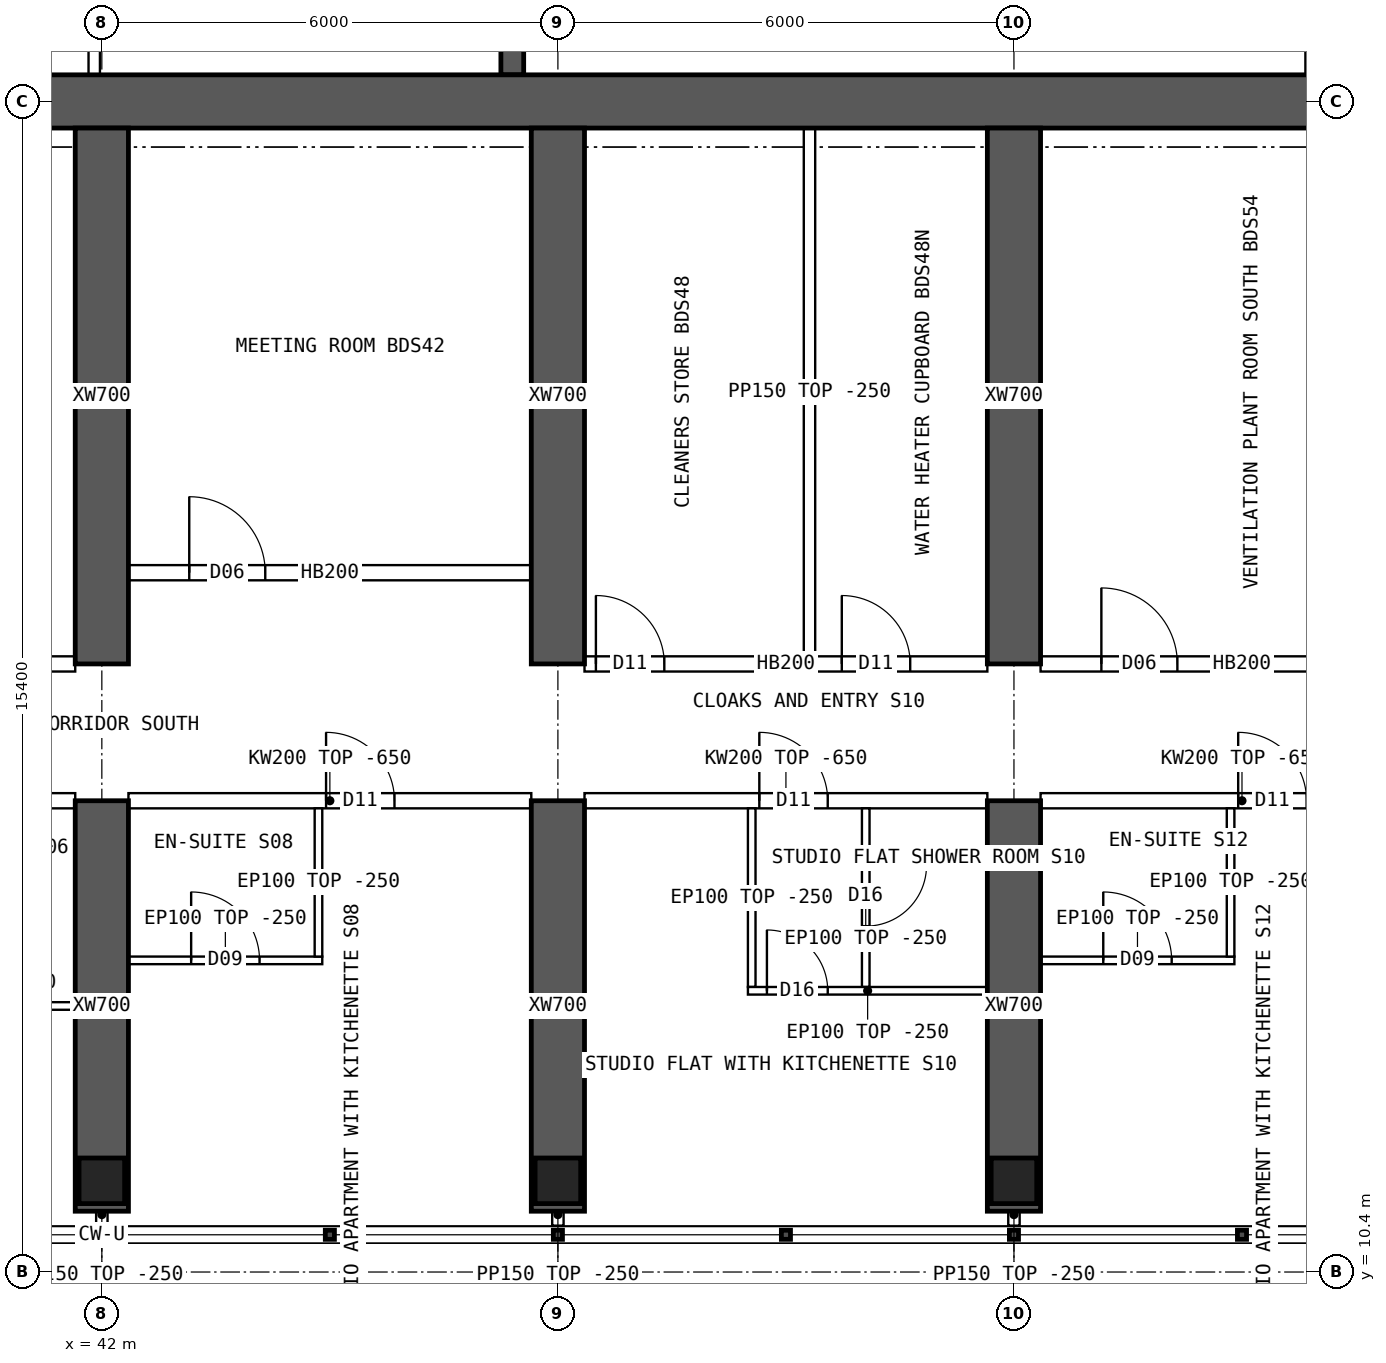
"""IFC4 building model, lengths in metres.
Left out: names, types, materials, properties, quantities, classifications, styles, units other than length and angle.
Written with IfcOpenShell. Run it as: python <this file> out.ifc"""

import sys

from ifc_helpers import new_model, si_unit, direction, frame, frame_2d, origin, origin_2d, place, context, subcontext, project, spatial, polyline, rectangle, hollow_rectangle, outline, extrude, element, fill, save


model = new_model("IFC4")
c1 = context("Model", 3, precision=1e-05, world=origin(), true_north=direction((0.0, 1.0)))
c2 = subcontext(c1, "Body", "Model", "MODEL_VIEW")
j1 = project(units=[si_unit("LENGTHUNIT", "METRE"), si_unit("PLANEANGLEUNIT", "RADIAN")], contexts=[c1])
p1 = place(None, origin())
s1 = spatial("IfcSite", under=j1, at=p1, CompositionType="ELEMENT")
p2 = place(p1, origin())
s2 = spatial("IfcBuilding", under=s1, at=p2, CompositionType="ELEMENT")
p3 = place(p2, frame((0.0, 0.0, 224.05)))
s3 = spatial("IfcBuildingStorey", under=s2, at=p3, CompositionType="ELEMENT", Elevation=224.05)
for number, where, z_axis, x_axis in (
    (1, (42.0, 11.6, 0.0), (0.0, 0.0, 1.0), (1.0, 0.0, 0.0)),
    (2, (48.0, 11.6, 0.0), (0.0, 0.0, 1.0), (1.0, 0.0, 0.0)),
    (3, (54.0, 11.6, 0.0), (0.0, 0.0, 1.0), (1.0, 0.0, 0.0)),
):
    element("IfcColumn", number, at=place(p3, frame(where, z_axis=z_axis, x_axis=x_axis)), inside=s3, PredefinedType="COLUMN", context=c2, shape_type="SweptSolid", body=[
        extrude(hollow_rectangle(XDim=0.6, YDim=0.6, WallThickness=0.06, at=origin_2d()), origin(), (0.0, 0.0, 1.0), 3.75),
    ])
p4 = place(p3, frame((18.0, 25.8, 0.0), z_axis=(0.0, 0.0, 1.0), x_axis=(1.0, 0.0, 0.0)))
e4 = element("IfcWall", 4, at=p4, inside=s3, PredefinedType="SHEAR", context=c2, shape_type="SweptSolid", body=[
    extrude(rectangle(XDim=48.0, YDim=0.7, at=frame_2d((24.0, 0.0))), origin(), (0.0, 0.0, 1.0), 3.75),
])
for number, where, z_axis, x_axis in (
    (5, (58.0, 26.15, 0.0), (0.0, 0.0, 1.0), (0.0, 1.0, 0.0)),
    (6, (47.4, 26.15, 0.0), (0.0, 0.0, 1.0), (0.0, 1.0, 0.0)),
):
    element("IfcWall", number, at=place(p3, frame(where, z_axis=z_axis, x_axis=x_axis)), inside=s3, PredefinedType="SHEAR", context=c2, shape_type="SweptSolid", body=[
        extrude(rectangle(XDim=4.1, YDim=0.3, at=frame_2d((2.05, 0.0))), origin(), (0.0, 0.0, 1.0), 3.75),
    ])
p5 = place(p3, frame((42.0, 11.2, 0.0), z_axis=(0.0, 0.0, 1.0), x_axis=(0.0, 1.0, 0.0)))
e7 = element("IfcWall", 7, at=p5, inside=s3, PredefinedType="SHEAR", context=c2, shape_type="SweptSolid", body=[
    extrude(rectangle(XDim=5.4, YDim=0.7, at=frame_2d((2.7, 0.0))), origin(), (0.0, 0.0, 1.0), 3.75),
])
p6 = place(p3, frame((42.0, 18.4, 0.0), z_axis=(0.0, 0.0, 1.0), x_axis=(0.0, 1.0, 0.0)))
e8 = element("IfcWall", 8, at=p6, inside=s3, PredefinedType="SHEAR", context=c2, shape_type="SweptSolid", body=[
    extrude(rectangle(XDim=7.05, YDim=0.7, at=frame_2d((3.525, 0.0))), origin(), (0.0, 0.0, 1.0), 3.75),
])
p7 = place(p3, frame((48.0, 11.2, 0.0), z_axis=(0.0, 0.0, 1.0), x_axis=(0.0, 1.0, 0.0)))
e9 = element("IfcWall", 9, at=p7, inside=s3, PredefinedType="SHEAR", context=c2, shape_type="SweptSolid", body=[
    extrude(rectangle(XDim=5.4, YDim=0.7, at=frame_2d((2.7, 0.0))), origin(), (0.0, 0.0, 1.0), 3.75),
])
p8 = place(p3, frame((48.0, 18.4, 0.0), z_axis=(0.0, 0.0, 1.0), x_axis=(0.0, 1.0, 0.0)))
e10 = element("IfcWall", 10, at=p8, inside=s3, PredefinedType="SHEAR", context=c2, shape_type="SweptSolid", body=[
    extrude(rectangle(XDim=7.05, YDim=0.7, at=frame_2d((3.525, 0.0))), origin(), (0.0, 0.0, 1.0), 3.75),
])
p9 = place(p3, frame((54.0, 11.2, 0.0), z_axis=(0.0, 0.0, 1.0), x_axis=(0.0, 1.0, 0.0)))
e11 = element("IfcWall", 11, at=p9, inside=s3, PredefinedType="SHEAR", context=c2, shape_type="SweptSolid", body=[
    extrude(rectangle(XDim=5.4, YDim=0.7, at=frame_2d((2.7, 0.0))), origin(), (0.0, 0.0, 1.0), 3.75),
])
p10 = place(p3, frame((54.0, 18.4, 0.0), z_axis=(0.0, 0.0, 1.0), x_axis=(0.0, 1.0, 0.0)))
e12 = element("IfcWall", 12, at=p10, inside=s3, PredefinedType="SHEAR", context=c2, shape_type="SweptSolid", body=[
    extrude(rectangle(XDim=7.05, YDim=0.7, at=frame_2d((3.525, 0.0))), origin(), (0.0, 0.0, 1.0), 3.75),
])
p11 = place(p3, frame((41.9, 26.15, 0.0), z_axis=(0.0, 0.0, 1.0), x_axis=(0.0, 1.0, 0.0)))
e13 = element("IfcWall", 13, at=p11, inside=s3, PredefinedType="SOLIDWALL", context=c2, shape_type="SweptSolid", body=[
    extrude(rectangle(XDim=4.1, YDim=0.15, at=frame_2d((2.05, 0.0))), origin(), (0.0, 0.0, 1.0), 3.5),
])
p12 = place(p3, frame((36.35, 16.6, 0.0), z_axis=(0.0, 0.0, 1.0), x_axis=(1.0, 0.0, 0.0)))
e14 = element("IfcWall", 14, at=p12, inside=s3, PredefinedType="SOLIDWALL", context=c2, shape_type="SweptSolid", body=[
    extrude(outline(polyline([(0.0, 0.0), (5.3, 0.0), (5.3, 3.1), (0.0, 3.1), (0.0, 0.0)])), frame((0.0, 0.1, 0.0), z_axis=(0.0, -1.0, 0.0), x_axis=(1.0, 0.0, 0.0)), (0.0, 0.0, 1.0), 0.2),
])
p13 = place(p12, frame((0.3, 0.0, 0.0)))
e15 = element("IfcOpeningElement", 15, at=p13, cuts=e14, PredefinedType="OPENING", context=c2, shape_type="SweptSolid", body=[
    extrude(rectangle(XDim=1.0, YDim=2.1, at=frame_2d((0.5, 1.05))), frame((0.0, 0.11, 0.0), z_axis=(0.0, -1.0, 0.0), x_axis=(1.0, 0.0, 0.0)), (0.0, 0.0, 1.0), 0.22),
])
p14 = place(p3, frame((36.35, 18.4, 0.0), z_axis=(0.0, 0.0, 1.0), x_axis=(1.0, 0.0, 0.0)))
e16 = element("IfcWall", 16, at=p14, inside=s3, PredefinedType="SOLIDWALL", context=c2, shape_type="SweptSolid", body=[
    extrude(rectangle(XDim=5.3, YDim=0.2, at=frame_2d((2.65, 0.0))), origin(), (0.0, 0.0, 1.0), 3.5),
])
p15 = place(p14, frame((0.525, 0.0, 0.0)))
e17 = element("IfcOpeningElement", 17, at=p15, cuts=e16, PredefinedType="OPENING", context=c2, shape_type="SweptSolid", body=[
    extrude(rectangle(XDim=1.0, YDim=2.1, at=frame_2d((0.5, 1.05))), frame((0.0, 0.11, 0.0), z_axis=(0.0, -1.0, 0.0), x_axis=(1.0, 0.0, 0.0)), (0.0, 0.0, 1.0), 0.22),
])
p16 = place(p3, frame((42.35, 16.6, 0.0), z_axis=(0.0, 0.0, 1.0), x_axis=(1.0, 0.0, 0.0)))
e18 = element("IfcWall", 18, at=p16, inside=s3, PredefinedType="SOLIDWALL", context=c2, shape_type="SweptSolid", body=[
    extrude(outline(polyline([(0.0, 0.0), (5.3, 0.0), (5.3, 3.1), (0.0, 3.1), (0.0, 0.0)])), frame((0.0, 0.1, 0.0), z_axis=(0.0, -1.0, 0.0), x_axis=(1.0, 0.0, 0.0)), (0.0, 0.0, 1.0), 0.2),
])
p17 = place(p16, frame((2.6, 0.0, 0.0)))
e19 = element("IfcOpeningElement", 19, at=p17, cuts=e18, PredefinedType="OPENING", context=c2, shape_type="SweptSolid", body=[
    extrude(rectangle(XDim=0.9, YDim=2.1, at=frame_2d((0.45, 1.05))), frame((0.0, 0.11, 0.0), z_axis=(0.0, -1.0, 0.0), x_axis=(1.0, 0.0, 0.0)), (0.0, 0.0, 1.0), 0.22),
])
p18 = place(p3, frame((48.35, 16.6, 0.0), z_axis=(0.0, 0.0, 1.0), x_axis=(1.0, 0.0, 0.0)))
e20 = element("IfcWall", 20, at=p18, inside=s3, PredefinedType="SOLIDWALL", context=c2, shape_type="SweptSolid", body=[
    extrude(outline(polyline([(0.0, 0.0), (5.3, 0.0), (5.3, 3.1), (0.0, 3.1), (0.0, 0.0)])), frame((0.0, 0.1, 0.0), z_axis=(0.0, -1.0, 0.0), x_axis=(1.0, 0.0, 0.0)), (0.0, 0.0, 1.0), 0.2),
])
p19 = place(p18, frame((2.3, 0.0, 0.0)))
e21 = element("IfcOpeningElement", 21, at=p19, cuts=e20, PredefinedType="OPENING", context=c2, shape_type="SweptSolid", body=[
    extrude(rectangle(XDim=0.9, YDim=2.1, at=frame_2d((0.45, 1.05))), frame((0.0, 0.11, 0.0), z_axis=(0.0, -1.0, 0.0), x_axis=(1.0, 0.0, 0.0)), (0.0, 0.0, 1.0), 0.22),
])
p20 = place(p3, frame((48.35, 18.4, 0.0), z_axis=(0.0, 0.0, 1.0), x_axis=(1.0, 0.0, 0.0)))
e22 = element("IfcWall", 22, at=p20, inside=s3, PredefinedType="SOLIDWALL", context=c2, shape_type="SweptSolid", body=[
    extrude(rectangle(XDim=5.3, YDim=0.2, at=frame_2d((2.65, 0.0))), origin(), (0.0, 0.0, 1.0), 3.5),
])
p21 = place(p20, frame((0.15, 0.0, 0.0)))
e23 = element("IfcOpeningElement", 23, at=p21, cuts=e22, PredefinedType="OPENING", context=c2, shape_type="SweptSolid", body=[
    extrude(rectangle(XDim=0.9, YDim=2.1, at=frame_2d((0.45, 1.05))), frame((0.0, 0.11, 0.0), z_axis=(0.0, -1.0, 0.0), x_axis=(1.0, 0.0, 0.0)), (0.0, 0.0, 1.0), 0.22),
])
p22 = place(p20, frame((3.385, 0.0, 0.0)))
e24 = element("IfcOpeningElement", 24, at=p22, cuts=e22, PredefinedType="OPENING", context=c2, shape_type="SweptSolid", body=[
    extrude(rectangle(XDim=0.9, YDim=2.1, at=frame_2d((0.45, 1.05))), frame((0.0, 0.11, 0.0), z_axis=(0.0, -1.0, 0.0), x_axis=(1.0, 0.0, 0.0)), (0.0, 0.0, 1.0), 0.22),
])
p23 = place(p3, frame((54.35, 16.6, 0.0), z_axis=(0.0, 0.0, 1.0), x_axis=(1.0, 0.0, 0.0)))
e25 = element("IfcWall", 25, at=p23, inside=s3, PredefinedType="SOLIDWALL", context=c2, shape_type="SweptSolid", body=[
    extrude(outline(polyline([(0.0, 0.0), (5.3, 0.0), (5.3, 3.1), (0.0, 3.1), (0.0, 0.0)])), frame((0.0, 0.1, 0.0), z_axis=(0.0, -1.0, 0.0), x_axis=(1.0, 0.0, 0.0)), (0.0, 0.0, 1.0), 0.2),
])
p24 = place(p23, frame((2.6, 0.0, 0.0)))
e26 = element("IfcOpeningElement", 26, at=p24, cuts=e25, PredefinedType="OPENING", context=c2, shape_type="SweptSolid", body=[
    extrude(rectangle(XDim=0.9, YDim=2.1, at=frame_2d((0.45, 1.05))), frame((0.0, 0.11, 0.0), z_axis=(0.0, -1.0, 0.0), x_axis=(1.0, 0.0, 0.0)), (0.0, 0.0, 1.0), 0.22),
])
p25 = place(p3, frame((54.35, 18.4, 0.0), z_axis=(0.0, 0.0, 1.0), x_axis=(1.0, 0.0, 0.0)))
e27 = element("IfcWall", 27, at=p25, inside=s3, PredefinedType="SOLIDWALL", context=c2, shape_type="SweptSolid", body=[
    extrude(rectangle(XDim=5.3, YDim=0.2, at=frame_2d((2.65, 0.0))), origin(), (0.0, 0.0, 1.0), 3.5),
])
p26 = place(p25, frame((0.8, 0.0, 0.0)))
e28 = element("IfcOpeningElement", 28, at=p26, cuts=e27, PredefinedType="OPENING", context=c2, shape_type="SweptSolid", body=[
    extrude(rectangle(XDim=1.0, YDim=2.1, at=frame_2d((0.5, 1.05))), frame((0.0, 0.11, 0.0), z_axis=(0.0, -1.0, 0.0), x_axis=(1.0, 0.0, 0.0)), (0.0, 0.0, 1.0), 0.22),
])
p27 = place(p3, frame((39.0, 13.9, 0.0), z_axis=(0.0, 0.0, 1.0), x_axis=(1.0, 0.0, 0.0)))
e29 = element("IfcWall", 29, at=p27, inside=s3, PredefinedType="PARTITIONING", context=c2, shape_type="SweptSolid", body=[
    extrude(rectangle(XDim=2.65, YDim=0.1, at=frame_2d((1.325, 0.0))), origin(), (0.0, 0.0, 1.0), 3.5),
])
p28 = place(p3, frame((44.9, 14.5, 0.0), z_axis=(0.0, 0.0, 1.0), x_axis=(-1.0, 0.0, 0.0)))
e30 = element("IfcWall", 30, at=p28, inside=s3, PredefinedType="PARTITIONING", context=c2, shape_type="SweptSolid", body=[
    extrude(rectangle(XDim=2.55, YDim=0.1, at=frame_2d((1.275, 0.0))), origin(), (0.0, 0.0, 1.0), 3.5),
])
p29 = place(p28, frame((0.825, 0.0, 0.0)))
e31 = element("IfcOpeningElement", 31, at=p29, cuts=e30, PredefinedType="OPENING", context=c2, shape_type="SweptSolid", body=[
    extrude(rectangle(XDim=0.9, YDim=2.1, at=frame_2d((0.45, 1.05))), frame((0.0, 0.06, 0.0), z_axis=(0.0, -1.0, 0.0), x_axis=(1.0, 0.0, 0.0)), (0.0, 0.0, 1.0), 0.12),
])
p30 = place(p3, frame((44.85, 14.55, 0.0), z_axis=(0.0, 0.0, 1.0), x_axis=(0.0, 1.0, 0.0)))
e32 = element("IfcWall", 32, at=p30, inside=s3, PredefinedType="PARTITIONING", context=c2, shape_type="SweptSolid", body=[
    extrude(outline(polyline([(0.0, 0.0), (1.95, 0.0), (1.95, 3.1), (1.902, 3.1), (1.9, 3.5), (0.0, 3.5), (0.0, 0.0)])), frame((0.0, 0.05, 0.0), z_axis=(0.0, -1.0, 0.0), x_axis=(1.0, 0.0, 0.0)), (0.0, 0.0, 1.0), 0.1),
])
p31 = place(p3, frame((53.65, 14.1, 0.0), z_axis=(0.0, 0.0, 1.0), x_axis=(-1.0, 0.0, 0.0)))
e33 = element("IfcWall", 33, at=p31, inside=s3, PredefinedType="PARTITIONING", context=c2, shape_type="SweptSolid", body=[
    extrude(rectangle(XDim=3.15, YDim=0.1, at=frame_2d((1.575, 0.0))), origin(), (0.0, 0.0, 1.0), 3.5),
])
p32 = place(p31, frame((2.1, 0.0, 0.0)))
e34 = element("IfcOpeningElement", 34, at=p32, cuts=e33, PredefinedType="OPENING", context=c2, shape_type="SweptSolid", body=[
    extrude(rectangle(XDim=0.8, YDim=2.1, at=frame_2d((0.4, 1.05))), frame((0.0, 0.06, 0.0), z_axis=(0.0, -1.0, 0.0), x_axis=(1.0, 0.0, 0.0)), (0.0, 0.0, 1.0), 0.12),
])
p33 = place(p3, frame((50.55, 14.15, 0.0), z_axis=(0.0, 0.0, 1.0), x_axis=(0.0, 1.0, 0.0)))
e35 = element("IfcWall", 35, at=p33, inside=s3, PredefinedType="PARTITIONING", context=c2, shape_type="SweptSolid", body=[
    extrude(outline(polyline([(0.0, 0.0), (2.35, 0.0), (2.35, 3.1), (2.302, 3.1), (2.3, 3.5), (0.0, 3.5), (0.0, 0.0)])), frame((0.0, 0.05, 0.0), z_axis=(0.0, -1.0, 0.0), x_axis=(1.0, 0.0, 0.0)), (0.0, 0.0, 1.0), 0.1),
])
p34 = place(p3, frame((52.05, 14.15, 0.0), z_axis=(0.0, 0.0, 1.0), x_axis=(0.0, 1.0, 0.0)))
e36 = element("IfcWall", 36, at=p34, inside=s3, PredefinedType="PARTITIONING", context=c2, shape_type="SweptSolid", body=[
    extrude(outline(polyline([(0.0, 0.0), (2.35, 0.0), (2.35, 3.1), (2.302, 3.1), (2.3, 3.5), (0.0, 3.5), (0.0, 0.0)])), frame((0.0, 0.05, 0.0), z_axis=(0.0, -1.0, 0.0), x_axis=(1.0, 0.0, 0.0)), (0.0, 0.0, 1.0), 0.1),
])
p35 = place(p34, frame((0.8, 0.0, 0.0)))
e37 = element("IfcOpeningElement", 37, at=p35, cuts=e36, PredefinedType="OPENING", context=c2, shape_type="SweptSolid", body=[
    extrude(rectangle(XDim=0.8, YDim=2.1, at=frame_2d((0.4, 1.05))), frame((0.0, 0.06, 0.0), z_axis=(0.0, -1.0, 0.0), x_axis=(1.0, 0.0, 0.0)), (0.0, 0.0, 1.0), 0.12),
])
p36 = place(p3, frame((56.9, 14.5, 0.0), z_axis=(0.0, 0.0, 1.0), x_axis=(-1.0, 0.0, 0.0)))
e38 = element("IfcWall", 38, at=p36, inside=s3, PredefinedType="PARTITIONING", context=c2, shape_type="SweptSolid", body=[
    extrude(rectangle(XDim=2.55, YDim=0.1, at=frame_2d((1.275, 0.0))), origin(), (0.0, 0.0, 1.0), 3.5),
])
p37 = place(p36, frame((0.825, 0.0, 0.0)))
e39 = element("IfcOpeningElement", 39, at=p37, cuts=e38, PredefinedType="OPENING", context=c2, shape_type="SweptSolid", body=[
    extrude(rectangle(XDim=0.9, YDim=2.1, at=frame_2d((0.45, 1.05))), frame((0.0, 0.06, 0.0), z_axis=(0.0, -1.0, 0.0), x_axis=(1.0, 0.0, 0.0)), (0.0, 0.0, 1.0), 0.12),
])
p38 = place(p3, frame((56.85, 14.55, 0.0), z_axis=(0.0, 0.0, 1.0), x_axis=(0.0, 1.0, 0.0)))
e40 = element("IfcWall", 40, at=p38, inside=s3, PredefinedType="PARTITIONING", context=c2, shape_type="SweptSolid", body=[
    extrude(outline(polyline([(0.0, 0.0), (1.95, 0.0), (1.95, 3.1), (1.902, 3.1), (1.9, 3.5), (0.0, 3.5), (0.0, 0.0)])), frame((0.0, 0.05, 0.0), z_axis=(0.0, -1.0, 0.0), x_axis=(1.0, 0.0, 0.0)), (0.0, 0.0, 1.0), 0.1),
])
p39 = place(p3, frame((42.35, 19.6, 0.0), z_axis=(0.0, 0.0, 1.0), x_axis=(1.0, 0.0, 0.0)))
e41 = element("IfcWall", 41, at=p39, inside=s3, PredefinedType="SOLIDWALL", context=c2, shape_type="SweptSolid", body=[
    extrude(rectangle(XDim=5.3, YDim=0.2, at=frame_2d((2.65, 0.0))), origin(), (0.0, 0.0, 1.0), 3.5),
])
p40 = place(p39, frame((0.8, 0.0, 0.0)))
e42 = element("IfcOpeningElement", 42, at=p40, cuts=e41, PredefinedType="OPENING", context=c2, shape_type="SweptSolid", body=[
    extrude(rectangle(XDim=1.0, YDim=2.1, at=frame_2d((0.5, 1.05))), frame((0.0, 0.11, 0.0), z_axis=(0.0, -1.0, 0.0), x_axis=(1.0, 0.0, 0.0)), (0.0, 0.0, 1.0), 0.22),
])
p41 = place(p3, frame((51.31, 18.5, 0.0), z_axis=(0.0, 0.0, 1.0), x_axis=(0.0, 1.0, 0.0)))
e43 = element("IfcWall", 43, at=p41, inside=s3, PredefinedType="PARTITIONING", context=c2, shape_type="SweptSolid", body=[
    extrude(rectangle(XDim=6.95, YDim=0.15, at=frame_2d((3.475, 0.0))), origin(), (0.0, 0.0, 1.0), 3.5),
])
for number, where, z_axis, x_axis in (
    (44, (42.0, 11.3, 0.0), (0.0, 0.0, 1.0), (0.0, -1.0, 0.0)),
    (45, (48.0, 11.3, 0.0), (0.0, 0.0, 1.0), (0.0, -1.0, 0.0)),
    (46, (54.0, 11.3, 0.0), (0.0, 0.0, 1.0), (0.0, -1.0, 0.0)),
):
    element("IfcWall", number, at=place(p3, frame(where, z_axis=z_axis, x_axis=x_axis)), inside=s3, PredefinedType="PARTITIONING", context=c2, shape_type="SweptSolid", body=[
        extrude(rectangle(XDim=0.29, YDim=0.15, at=frame_2d((0.145, 0.0))), origin(), (0.0, 0.0, 1.0), 3.5),
    ])
p42 = place(p29, origin())
e47 = element("IfcDoor", 47, at=p42, inside=s3, OperationType="SINGLE_SWING_RIGHT", PredefinedType="DOOR", context=c2, shape_type="SweptSolid", body=[
    extrude(rectangle(XDim=0.9, YDim=2.1, at=frame_2d((0.45, 1.05))), frame((0.0, 0.025, 0.0), z_axis=(0.0, -1.0, 0.0), x_axis=(1.0, 0.0, 0.0)), (0.0, 0.0, 1.0), 0.05),
])
fill(e31, e47)
p43 = place(p17, origin())
e48 = element("IfcDoor", 48, at=p43, inside=s3, OperationType="SINGLE_SWING_LEFT", PredefinedType="DOOR", context=c2, shape_type="SweptSolid", body=[
    extrude(rectangle(XDim=0.9, YDim=2.1, at=frame_2d((0.45, 1.05))), frame((0.0, 0.025, 0.0), z_axis=(0.0, -1.0, 0.0), x_axis=(1.0, 0.0, 0.0)), (0.0, 0.0, 1.0), 0.05),
])
fill(e19, e48)
p44 = place(p32, origin())
e49 = element("IfcDoor", 49, at=p44, inside=s3, OperationType="SINGLE_SWING_RIGHT", PredefinedType="DOOR", context=c2, shape_type="SweptSolid", body=[
    extrude(rectangle(XDim=0.8, YDim=2.1, at=frame_2d((0.4, 1.05))), frame((0.0, 0.025, 0.0), z_axis=(0.0, -1.0, 0.0), x_axis=(1.0, 0.0, 0.0)), (0.0, 0.0, 1.0), 0.05),
])
fill(e34, e49)
p45 = place(p35, origin())
e50 = element("IfcDoor", 50, at=p45, inside=s3, OperationType="SINGLE_SWING_RIGHT", PredefinedType="DOOR", context=c2, shape_type="SweptSolid", body=[
    extrude(rectangle(XDim=0.8, YDim=2.1, at=frame_2d((0.4, 1.05))), frame((0.0, 0.025, 0.0), z_axis=(0.0, -1.0, 0.0), x_axis=(1.0, 0.0, 0.0)), (0.0, 0.0, 1.0), 0.05),
])
fill(e37, e50)
p46 = place(p19, origin())
e51 = element("IfcDoor", 51, at=p46, inside=s3, OperationType="SINGLE_SWING_LEFT", PredefinedType="DOOR", context=c2, shape_type="SweptSolid", body=[
    extrude(rectangle(XDim=0.9, YDim=2.1, at=frame_2d((0.45, 1.05))), frame((0.0, 0.025, 0.0), z_axis=(0.0, -1.0, 0.0), x_axis=(1.0, 0.0, 0.0)), (0.0, 0.0, 1.0), 0.05),
])
fill(e21, e51)
p47 = place(p37, origin())
e52 = element("IfcDoor", 52, at=p47, inside=s3, OperationType="SINGLE_SWING_RIGHT", PredefinedType="DOOR", context=c2, shape_type="SweptSolid", body=[
    extrude(rectangle(XDim=0.9, YDim=2.1, at=frame_2d((0.45, 1.05))), frame((0.0, 0.025, 0.0), z_axis=(0.0, -1.0, 0.0), x_axis=(1.0, 0.0, 0.0)), (0.0, 0.0, 1.0), 0.05),
])
fill(e39, e52)
p48 = place(p24, origin())
e53 = element("IfcDoor", 53, at=p48, inside=s3, OperationType="SINGLE_SWING_LEFT", PredefinedType="DOOR", context=c2, shape_type="SweptSolid", body=[
    extrude(rectangle(XDim=0.9, YDim=2.1, at=frame_2d((0.45, 1.05))), frame((0.0, 0.025, 0.0), z_axis=(0.0, -1.0, 0.0), x_axis=(1.0, 0.0, 0.0)), (0.0, 0.0, 1.0), 0.05),
])
fill(e26, e53)
p49 = place(p40, origin())
e54 = element("IfcDoor", 54, at=p49, inside=s3, OperationType="SINGLE_SWING_LEFT", PredefinedType="DOOR", context=c2, shape_type="SweptSolid", body=[
    extrude(rectangle(XDim=1.0, YDim=2.1, at=frame_2d((0.5, 1.05))), frame((0.0, 0.025, 0.0), z_axis=(0.0, -1.0, 0.0), x_axis=(1.0, 0.0, 0.0)), (0.0, 0.0, 1.0), 0.05),
])
fill(e42, e54)
p50 = place(p21, origin())
e55 = element("IfcDoor", 55, at=p50, inside=s3, OperationType="SINGLE_SWING_LEFT", PredefinedType="DOOR", context=c2, shape_type="SweptSolid", body=[
    extrude(rectangle(XDim=0.9, YDim=2.1, at=frame_2d((0.45, 1.05))), frame((0.0, 0.025, 0.0), z_axis=(0.0, -1.0, 0.0), x_axis=(1.0, 0.0, 0.0)), (0.0, 0.0, 1.0), 0.05),
])
fill(e23, e55)
p51 = place(p22, origin())
e56 = element("IfcDoor", 56, at=p51, inside=s3, OperationType="SINGLE_SWING_LEFT", PredefinedType="DOOR", context=c2, shape_type="SweptSolid", body=[
    extrude(rectangle(XDim=0.9, YDim=2.1, at=frame_2d((0.45, 1.05))), frame((0.0, 0.025, 0.0), z_axis=(0.0, -1.0, 0.0), x_axis=(1.0, 0.0, 0.0)), (0.0, 0.0, 1.0), 0.05),
])
fill(e24, e56)
p52 = place(p26, origin())
e57 = element("IfcDoor", 57, at=p52, inside=s3, OperationType="SINGLE_SWING_LEFT", PredefinedType="DOOR", context=c2, shape_type="SweptSolid", body=[
    extrude(rectangle(XDim=1.0, YDim=2.1, at=frame_2d((0.5, 1.05))), frame((0.0, 0.025, 0.0), z_axis=(0.0, -1.0, 0.0), x_axis=(1.0, 0.0, 0.0)), (0.0, 0.0, 1.0), 0.05),
])
fill(e28, e57)
save(model, sys.argv[1])
